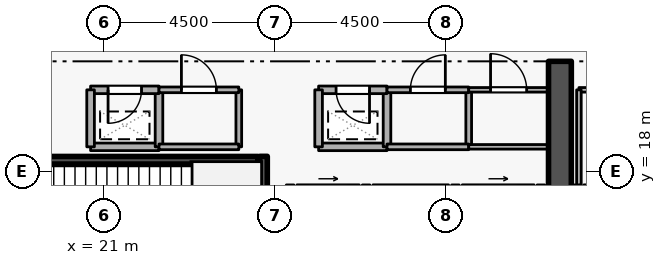
"""IFC4 building model, lengths in metres.
Left out: names, types, materials, properties, quantities, classifications, styles, units other than length and angle.
Written with IfcOpenShell. Run it as: python <this file> out.ifc"""

import sys

from ifc_helpers import new_model, si_unit, direction, frame, frame_2d, origin, place, context, subcontext, project, spatial, rectangle, extrude, element, fill, save


model = new_model("IFC4")
c1 = context("Model", 3, precision=1e-05, world=origin(), true_north=direction((0.0, 1.0)))
c2 = subcontext(c1, "Body", "Model", "MODEL_VIEW")
j1 = project(units=[si_unit("LENGTHUNIT", "METRE"), si_unit("PLANEANGLEUNIT", "RADIAN")], contexts=[c1])
p1 = place(None, origin())
s1 = spatial("IfcSite", under=j1, at=p1, CompositionType="ELEMENT")
p2 = place(p1, origin())
s2 = spatial("IfcBuilding", under=s1, at=p2, CompositionType="ELEMENT")
p3 = place(p2, frame((0.0, 0.0, 23.1)))
s3 = spatial("IfcBuildingStorey", under=s2, at=p3, CompositionType="ELEMENT", Elevation=23.1)
p4 = place(p3, frame((33.0, 15.2, 0.0), z_axis=(0.0, 0.0, 1.0), x_axis=(0.0, 1.0, 0.0)))
e1 = element("IfcWall", 1, at=p4, inside=s3, PredefinedType="SHEAR", context=c2, shape_type="SweptSolid", body=[
    extrude(rectangle(XDim=5.7, YDim=0.6, at=frame_2d((2.85, 0.0))), origin(), (0.0, 0.0, 1.0), 4.8),
])
p5 = place(p3, frame((26.08, 17.55, 0.0), z_axis=(0.0, 0.0, 1.0), x_axis=(1.0, 0.0, 0.0)))
e2 = element("IfcWall", 2, at=p5, inside=s3, PredefinedType="STANDARD", context=c2, shape_type="SweptSolid", body=[
    extrude(rectangle(XDim=1.64, YDim=0.2, at=frame_2d((0.82, 0.0))), origin(), (0.0, 0.0, 1.0), 4.54),
])
p6 = place(p5, frame((0.31, 0.0, 0.0)))
e3 = element("IfcOpeningElement", 3, at=p6, cuts=e2, PredefinedType="OPENING", context=c2, shape_type="SweptSolid", body=[
    extrude(rectangle(XDim=1.02, YDim=2.06, at=frame_2d((0.51, 1.03))), frame((0.0, 0.11, 0.0), z_axis=(0.0, -1.0, 0.0), x_axis=(1.0, 0.0, 0.0)), (0.0, 0.0, 1.0), 0.22),
])
p7 = place(p3, frame((28.08, 17.55, 0.0), z_axis=(0.0, 0.0, 1.0), x_axis=(1.0, 0.0, 0.0)))
e4 = element("IfcWall", 4, at=p7, inside=s3, PredefinedType="STANDARD", context=c2, shape_type="SweptSolid", body=[
    extrude(rectangle(XDim=1.99, YDim=0.2, at=frame_2d((0.995, 0.0))), origin(), (0.0, 0.0, 1.0), 4.54),
])
p8 = place(p3, frame((30.43, 17.55, 0.0), z_axis=(0.0, 0.0, 1.0), x_axis=(1.0, 0.0, 0.0)))
e5 = element("IfcWall", 5, at=p8, inside=s3, PredefinedType="STANDARD", context=c2, shape_type="SweptSolid", body=[
    extrude(rectangle(XDim=1.89, YDim=0.2, at=frame_2d((0.945, 0.0))), origin(), (0.0, 0.0, 1.0), 4.54),
])
p9 = place(p8, frame((0.435, 0.0, 0.0)))
e6 = element("IfcOpeningElement", 6, at=p9, cuts=e5, PredefinedType="OPENING", context=c2, shape_type="SweptSolid", body=[
    extrude(rectangle(XDim=1.02, YDim=2.06, at=frame_2d((0.51, 1.03))), frame((0.0, 0.11, 0.0), z_axis=(0.0, -1.0, 0.0), x_axis=(1.0, 0.0, 0.0)), (0.0, 0.0, 1.0), 0.22),
])
p10 = place(p3, frame((33.63, 17.55, 0.0), z_axis=(0.0, 0.0, 1.0), x_axis=(1.0, 0.0, 0.0)))
e7 = element("IfcWall", 7, at=p10, inside=s3, PredefinedType="STANDARD", context=c2, shape_type="SweptSolid", body=[
    extrude(rectangle(XDim=1.74, YDim=0.2, at=frame_2d((0.87, 0.0))), origin(), (0.0, 0.0, 1.0), 4.54),
])
p11 = place(p10, frame((0.36, 0.0, 0.0)))
e8 = element("IfcOpeningElement", 8, at=p11, cuts=e7, PredefinedType="OPENING", context=c2, shape_type="SweptSolid", body=[
    extrude(rectangle(XDim=1.02, YDim=2.06, at=frame_2d((0.51, 1.03))), frame((0.0, 0.11, 0.0), z_axis=(0.0, -1.0, 0.0), x_axis=(1.0, 0.0, 0.0)), (0.0, 0.0, 1.0), 0.22),
])
p12 = place(p3, frame((25.2, 18.4, 0.0), z_axis=(0.0, 0.0, 1.0), x_axis=(0.0, -1.0, 0.0)))
e9 = element("IfcWall", 9, at=p12, inside=s3, PredefinedType="SHEAR", context=c2, shape_type="SweptSolid", body=[
    extrude(rectangle(XDim=3.35, YDim=0.2, at=frame_2d((1.675, 0.0))), origin(), (0.0, 0.0, 1.0), 4.8),
])
p13 = place(p3, frame((25.05, 18.297, 0.0), z_axis=(0.0, 0.0, 1.0), x_axis=(-1.0, 0.0, 0.0)))
e10 = element("IfcWall", 10, at=p13, inside=s3, PredefinedType="SHEAR", context=c2, shape_type="SweptSolid", body=[
    extrude(rectangle(XDim=7.1, YDim=0.2, at=frame_2d((3.55, 0.0))), origin(), (0.0, 0.0, 1.0), 4.8),
])
p14 = place(p3, frame((26.65, 18.65, 0.0), z_axis=(0.0, 0.0, 1.0), x_axis=(1.0, 0.0, 0.0)))
e11 = element("IfcWall", 11, at=p14, inside=s3, PredefinedType="STANDARD", context=c2, shape_type="SweptSolid", body=[
    extrude(rectangle(XDim=1.8, YDim=0.2, at=frame_2d((0.9, 0.0))), origin(), (0.0, 0.0, 1.0), 4.54),
])
p15 = place(p3, frame((28.45, 18.65, 0.0), z_axis=(0.0, 0.0, 1.0), x_axis=(0.0, 1.0, 0.0)))
e12 = element("IfcWall", 12, at=p15, inside=s3, PredefinedType="STANDARD", context=c2, shape_type="SweptSolid", body=[
    extrude(rectangle(XDim=1.5, YDim=0.2, at=frame_2d((0.75, 0.0))), origin(), (0.0, 0.0, 1.0), 4.54),
])
p16 = place(p3, frame((28.45, 20.15, 0.0), z_axis=(0.0, 0.0, 1.0), x_axis=(-1.0, 0.0, 0.0)))
e13 = element("IfcWall", 13, at=p16, inside=s3, PredefinedType="STANDARD", context=c2, shape_type="SweptSolid", body=[
    extrude(rectangle(XDim=1.8, YDim=0.2, at=frame_2d((0.9, 0.0))), origin(), (0.0, 0.0, 1.0), 4.54),
])
p17 = place(p16, frame((0.46, 0.0, 0.0)))
e14 = element("IfcOpeningElement", 14, at=p17, cuts=e13, PredefinedType="OPENING", context=c2, shape_type="SweptSolid", body=[
    extrude(rectangle(XDim=0.88, YDim=2.04, at=frame_2d((0.44, 1.02))), frame((0.0, 0.11, 0.0), z_axis=(0.0, -1.0, 0.0), x_axis=(1.0, 0.0, 0.0)), (0.0, 0.0, 1.0), 0.22),
])
p18 = place(p3, frame((26.65, 20.15, 0.0), z_axis=(0.0, 0.0, 1.0), x_axis=(0.0, -1.0, 0.0)))
e15 = element("IfcWall", 15, at=p18, inside=s3, PredefinedType="STANDARD", context=c2, shape_type="SweptSolid", body=[
    extrude(rectangle(XDim=1.5, YDim=0.2, at=frame_2d((0.75, 0.0))), origin(), (0.0, 0.0, 1.0), 4.54),
])
p19 = place(p3, frame((20.65, 18.65, 0.0), z_axis=(0.0, 0.0, 1.0), x_axis=(1.0, 0.0, 0.0)))
e16 = element("IfcWall", 16, at=p19, inside=s3, PredefinedType="STANDARD", context=c2, shape_type="SweptSolid", body=[
    extrude(rectangle(XDim=1.8, YDim=0.2, at=frame_2d((0.9, 0.0))), origin(), (0.0, 0.0, 1.0), 4.54),
])
p20 = place(p3, frame((22.45, 18.65, 0.0), z_axis=(0.0, 0.0, 1.0), x_axis=(0.0, 1.0, 0.0)))
e17 = element("IfcWall", 17, at=p20, inside=s3, PredefinedType="STANDARD", context=c2, shape_type="SweptSolid", body=[
    extrude(rectangle(XDim=1.5, YDim=0.2, at=frame_2d((0.75, 0.0))), origin(), (0.0, 0.0, 1.0), 4.54),
])
p21 = place(p3, frame((22.45, 20.15, 0.0), z_axis=(0.0, 0.0, 1.0), x_axis=(-1.0, 0.0, 0.0)))
e18 = element("IfcWall", 18, at=p21, inside=s3, PredefinedType="STANDARD", context=c2, shape_type="SweptSolid", body=[
    extrude(rectangle(XDim=1.8, YDim=0.2, at=frame_2d((0.9, 0.0))), origin(), (0.0, 0.0, 1.0), 4.54),
])
p22 = place(p21, frame((0.46, 0.0, 0.0)))
e19 = element("IfcOpeningElement", 19, at=p22, cuts=e18, PredefinedType="OPENING", context=c2, shape_type="SweptSolid", body=[
    extrude(rectangle(XDim=0.88, YDim=2.04, at=frame_2d((0.44, 1.02))), frame((0.0, 0.11, 0.0), z_axis=(0.0, -1.0, 0.0), x_axis=(1.0, 0.0, 0.0)), (0.0, 0.0, 1.0), 0.22),
])
p23 = place(p3, frame((20.65, 20.15, 0.0), z_axis=(0.0, 0.0, 1.0), x_axis=(0.0, -1.0, 0.0)))
e20 = element("IfcWall", 20, at=p23, inside=s3, PredefinedType="STANDARD", context=c2, shape_type="SweptSolid", body=[
    extrude(rectangle(XDim=1.5, YDim=0.2, at=frame_2d((0.75, 0.0))), origin(), (0.0, 0.0, 1.0), 4.54),
])
p24 = place(p3, frame((24.55, 20.15, 0.0), z_axis=(0.0, 0.0, 1.0), x_axis=(0.0, -1.0, 0.0)))
e21 = element("IfcWall", 21, at=p24, inside=s3, PredefinedType="PARTITIONING", context=c2, shape_type="SweptSolid", body=[
    extrude(rectangle(XDim=1.5, YDim=0.15, at=frame_2d((0.75, 0.0))), origin(), (0.0, 0.0, 1.0), 4.54),
])
p25 = place(p3, frame((24.55, 18.65, 0.0), z_axis=(0.0, 0.0, 1.0), x_axis=(-1.0, 0.0, 0.0)))
e22 = element("IfcWall", 22, at=p25, inside=s3, PredefinedType="PARTITIONING", context=c2, shape_type="SweptSolid", body=[
    extrude(rectangle(XDim=2.1, YDim=0.15, at=frame_2d((1.05, 0.0))), origin(), (0.0, 0.0, 1.0), 4.54),
])
p26 = place(p3, frame((22.45, 20.15, 0.0), z_axis=(0.0, 0.0, 1.0), x_axis=(1.0, 0.0, 0.0)))
e23 = element("IfcWall", 23, at=p26, inside=s3, PredefinedType="PARTITIONING", context=c2, shape_type="SweptSolid", body=[
    extrude(rectangle(XDim=2.1, YDim=0.15, at=frame_2d((1.05, 0.0))), origin(), (0.0, 0.0, 1.0), 4.54),
])
p27 = place(p26, frame((0.59, 0.0, 0.0)))
e24 = element("IfcOpeningElement", 24, at=p27, cuts=e23, PredefinedType="OPENING", context=c2, shape_type="SweptSolid", body=[
    extrude(rectangle(XDim=0.92, YDim=2.08, at=frame_2d((0.46, 1.04))), frame((0.0, 0.085, 0.0), z_axis=(0.0, -1.0, 0.0), x_axis=(1.0, 0.0, 0.0)), (0.0, 0.0, 1.0), 0.17),
])
p28 = place(p3, frame((30.6, 20.15, 0.0), z_axis=(0.0, 0.0, 1.0), x_axis=(0.0, -1.0, 0.0)))
e25 = element("IfcWall", 25, at=p28, inside=s3, PredefinedType="PARTITIONING", context=c2, shape_type="SweptSolid", body=[
    extrude(rectangle(XDim=1.5, YDim=0.15, at=frame_2d((0.75, 0.0))), origin(), (0.0, 0.0, 1.0), 4.54),
])
p29 = place(p3, frame((30.6, 18.65, 0.0), z_axis=(0.0, 0.0, 1.0), x_axis=(-1.0, 0.0, 0.0)))
e26 = element("IfcWall", 26, at=p29, inside=s3, PredefinedType="PARTITIONING", context=c2, shape_type="SweptSolid", body=[
    extrude(rectangle(XDim=2.15, YDim=0.15, at=frame_2d((1.075, 0.0))), origin(), (0.0, 0.0, 1.0), 4.54),
])
p30 = place(p3, frame((28.45, 20.15, 0.0), z_axis=(0.0, 0.0, 1.0), x_axis=(1.0, 0.0, 0.0)))
e27 = element("IfcWall", 27, at=p30, inside=s3, PredefinedType="PARTITIONING", context=c2, shape_type="SweptSolid", body=[
    extrude(rectangle(XDim=2.15, YDim=0.15, at=frame_2d((1.075, 0.0))), origin(), (0.0, 0.0, 1.0), 4.54),
])
p31 = place(p30, frame((0.615, 0.0, 0.0)))
e28 = element("IfcOpeningElement", 28, at=p31, cuts=e27, PredefinedType="OPENING", context=c2, shape_type="SweptSolid", body=[
    extrude(rectangle(XDim=0.92, YDim=2.08, at=frame_2d((0.46, 1.04))), frame((0.0, 0.085, 0.0), z_axis=(0.0, -1.0, 0.0), x_axis=(1.0, 0.0, 0.0)), (0.0, 0.0, 1.0), 0.17),
])
p32 = place(p3, frame((32.7, 18.65, 0.0), z_axis=(0.0, 0.0, 1.0), x_axis=(-1.0, 0.0, 0.0)))
e29 = element("IfcWall", 29, at=p32, inside=s3, PredefinedType="PARTITIONING", context=c2, shape_type="SweptSolid", body=[
    extrude(rectangle(XDim=2.1, YDim=0.12, at=frame_2d((1.05, 0.0))), origin(), (0.0, 0.0, 1.0), 4.54),
])
p33 = place(p3, frame((30.6, 20.15, 0.0), z_axis=(0.0, 0.0, 1.0), x_axis=(1.0, 0.0, 0.0)))
e30 = element("IfcWall", 30, at=p33, inside=s3, PredefinedType="PARTITIONING", context=c2, shape_type="SweptSolid", body=[
    extrude(rectangle(XDim=2.1, YDim=0.12, at=frame_2d((1.05, 0.0))), origin(), (0.0, 0.0, 1.0), 4.54),
])
p34 = place(p33, frame((0.575, 0.0, 0.0)))
e31 = element("IfcOpeningElement", 31, at=p34, cuts=e30, PredefinedType="OPENING", context=c2, shape_type="SweptSolid", body=[
    extrude(rectangle(XDim=0.95, YDim=2.1, at=frame_2d((0.475, 1.05))), frame((0.0, 0.07, 0.0), z_axis=(0.0, -1.0, 0.0), x_axis=(1.0, 0.0, 0.0)), (0.0, 0.0, 1.0), 0.14),
])
p35 = place(p3, frame((33.5, 20.15, 0.0), z_axis=(0.0, 0.0, 1.0), x_axis=(1.0, 0.0, 0.0)))
e32 = element("IfcWall", 32, at=p35, inside=s3, PredefinedType="PARTITIONING", context=c2, shape_type="SweptSolid", body=[
    extrude(rectangle(XDim=21.5, YDim=0.12, at=frame_2d((10.75, 0.0))), origin(), (0.0, 0.0, 1.0), 4.54),
])
p36 = place(p35, frame((10.225, 0.0, 0.0)))
e33 = element("IfcOpeningElement", 33, at=p36, cuts=e32, PredefinedType="OPENING", context=c2, shape_type="SweptSolid", body=[
    extrude(rectangle(XDim=1.05, YDim=2.1, at=frame_2d((0.525, 1.05))), frame((0.0, 0.07, 0.0), z_axis=(0.0, -1.0, 0.0), x_axis=(1.0, 0.0, 0.0)), (0.0, 0.0, 1.0), 0.14),
])
p37 = place(p3, frame((33.5, 17.648, 0.0), z_axis=(0.0, 0.0, 1.0), x_axis=(0.0, 1.0, 0.0)))
e34 = element("IfcWall", 34, at=p37, inside=s3, PredefinedType="PARTITIONING", context=c2, shape_type="SweptSolid", body=[
    extrude(rectangle(XDim=2.502, YDim=0.12, at=frame_2d((1.251, 0.0))), origin(), (0.0, 0.0, 1.0), 4.54),
])
p38 = place(p17, origin())
e35 = element("IfcDoor", 35, at=p38, inside=s3, OperationType="SINGLE_SWING_LEFT", PredefinedType="DOOR", context=c2, shape_type="SweptSolid", body=[
    extrude(rectangle(XDim=0.88, YDim=2.04, at=frame_2d((0.44, 1.02))), frame((0.0, 0.025, 0.0), z_axis=(0.0, -1.0, 0.0), x_axis=(1.0, 0.0, 0.0)), (0.0, 0.0, 1.0), 0.05),
])
fill(e14, e35)
p39 = place(p22, origin())
e36 = element("IfcDoor", 36, at=p39, inside=s3, OperationType="SINGLE_SWING_RIGHT", PredefinedType="DOOR", context=c2, shape_type="SweptSolid", body=[
    extrude(rectangle(XDim=0.88, YDim=2.04, at=frame_2d((0.44, 1.02))), frame((0.0, 0.025, 0.0), z_axis=(0.0, -1.0, 0.0), x_axis=(1.0, 0.0, 0.0)), (0.0, 0.0, 1.0), 0.05),
])
fill(e19, e36)
p40 = place(p27, origin())
e37 = element("IfcDoor", 37, at=p40, inside=s3, OperationType="SINGLE_SWING_LEFT", PredefinedType="DOOR", context=c2, shape_type="SweptSolid", body=[
    extrude(rectangle(XDim=0.92, YDim=2.08, at=frame_2d((0.46, 1.04))), frame((0.0, 0.025, 0.0), z_axis=(0.0, -1.0, 0.0), x_axis=(1.0, 0.0, 0.0)), (0.0, 0.0, 1.0), 0.05),
])
fill(e24, e37)
p41 = place(p31, origin())
e38 = element("IfcDoor", 38, at=p41, inside=s3, OperationType="SINGLE_SWING_RIGHT", PredefinedType="DOOR", context=c2, shape_type="SweptSolid", body=[
    extrude(rectangle(XDim=0.92, YDim=2.08, at=frame_2d((0.46, 1.04))), frame((0.0, 0.025, 0.0), z_axis=(0.0, -1.0, 0.0), x_axis=(1.0, 0.0, 0.0)), (0.0, 0.0, 1.0), 0.05),
])
fill(e28, e38)
p42 = place(p34, origin())
e39 = element("IfcDoor", 39, at=p42, inside=s3, OperationType="SINGLE_SWING_LEFT", PredefinedType="DOOR", context=c2, shape_type="SweptSolid", body=[
    extrude(rectangle(XDim=0.95, YDim=2.1, at=frame_2d((0.475, 1.05))), frame((0.0, 0.025, 0.0), z_axis=(0.0, -1.0, 0.0), x_axis=(1.0, 0.0, 0.0)), (0.0, 0.0, 1.0), 0.05),
])
fill(e31, e39)
save(model, sys.argv[1])
